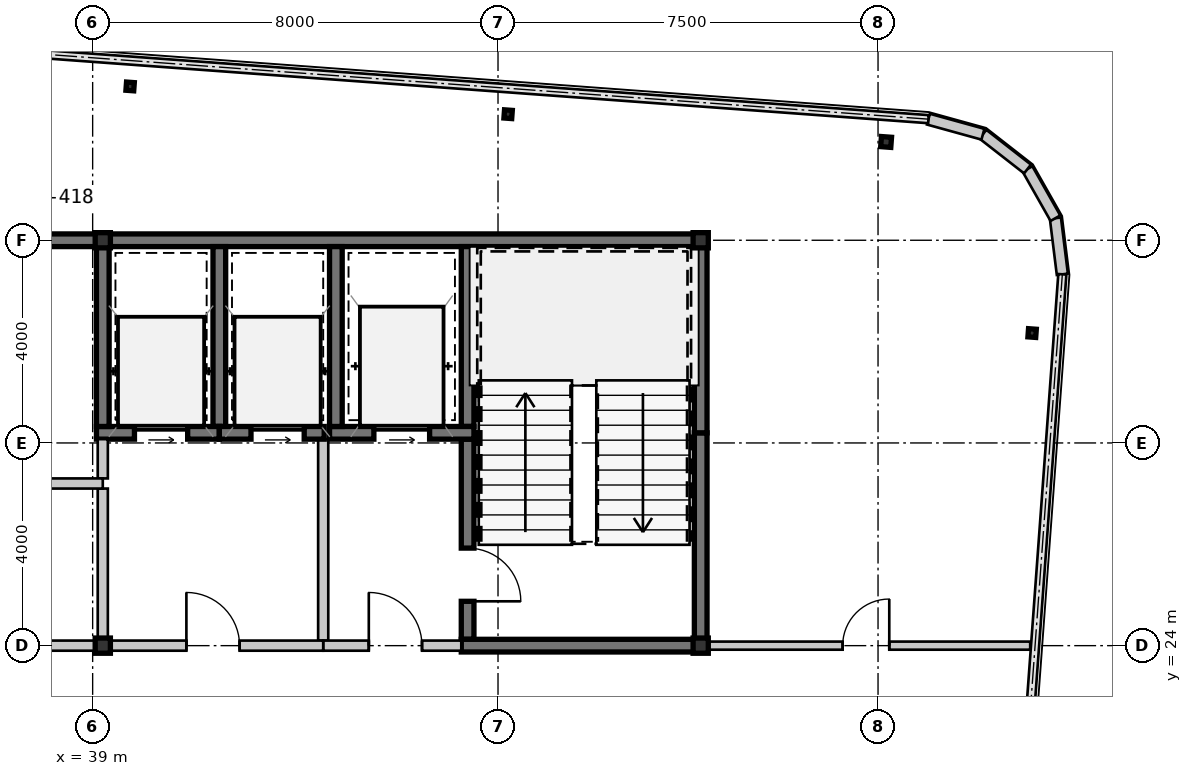
"""IFC4 building model, lengths in metres.
Left out: names, types, materials, properties, quantities, classifications, styles, units other than length and angle.
Written with IfcOpenShell. Run it as: python <this file> out.ifc"""

import sys

from ifc_helpers import new_model, si_unit, direction, frame, frame_2d, origin, origin_2d, place, context, subcontext, project, spatial, rectangle, hollow_rectangle, i_section, extrude, source, transform, mapped, element, fill, save


model = new_model("IFC4")
c1 = context("Model", 3, precision=1e-05, world=origin(), true_north=direction((0.0, 1.0)))
c2 = subcontext(c1, "Body", "Model", "MODEL_VIEW")
j1 = project(units=[si_unit("LENGTHUNIT", "METRE"), si_unit("PLANEANGLEUNIT", "RADIAN")], contexts=[c1])
p1 = place(None, origin())
s1 = spatial("IfcSite", under=j1, at=p1, CompositionType="ELEMENT")
p2 = place(p1, origin())
s2 = spatial("IfcBuilding", under=s1, at=p2, CompositionType="ELEMENT")
p3 = place(p2, frame((0.0, 0.0, 239.75)))
s3 = spatial("IfcBuildingStorey", under=s2, at=p3, CompositionType="ELEMENT", Elevation=239.75)
m1 = source(origin(), c2, "Body", "SweptSolid", [
    extrude(hollow_rectangle(XDim=0.3, YDim=0.3, WallThickness=0.012, at=origin_2d()), origin(), (0.0, 0.0, 1.0), 3.15),
])
for number, where, z_axis, x_axis in (
    (1, (39.2, 24.0, 0.0), (0.0, 0.0, 1.0), (1.0, 0.0, 0.0)),
    (2, (51.0, 24.0, 0.0), (0.0, 0.0, 1.0), (1.0, 0.0, 0.0)),
    (3, (39.2, 32.0, 0.0), (0.0, 0.0, 1.0), (1.0, 0.0, 0.0)),
    (4, (51.0, 32.0, 0.0), (0.0, 0.0, 1.0), (1.0, 0.0, 0.0)),
):
    element("IfcColumn", number, at=place(p3, frame(where, z_axis=z_axis, x_axis=x_axis)), inside=s3, PredefinedType="COLUMN", context=c2, shape_type="MappedRepresentation", body=[
        mapped(m1, transform((0.0, 0.0, 0.0), scale=1.0)),
    ])
m2 = source(origin(), c2, "Body", "SweptSolid", [
    extrude(i_section(OverallWidth=0.154, OverallDepth=0.162, WebThickness=0.008, FlangeThickness=0.011, at=origin_2d()), origin(), (0.0, 0.0, 1.0), 3.15),
])
for number, where, z_axis, x_axis in (
    (5, (39.74, 35.035, 0.0), (0.0, 0.0, 1.0), (0.997, -0.073, 0.0)),
    (6, (47.199, 34.488, 0.0), (0.0, 0.0, 1.0), (0.997, -0.073, 0.0)),
):
    element("IfcColumn", number, at=place(p3, frame(where, z_axis=z_axis, x_axis=x_axis)), inside=s3, PredefinedType="COLUMN", context=c2, shape_type="MappedRepresentation", body=[
        mapped(m2, transform((0.0, 0.0, 0.0), scale=1.0)),
    ])
m3 = source(origin(), c2, "Body", "SweptSolid", [
    extrude(hollow_rectangle(XDim=0.2, YDim=0.2, WallThickness=0.009, at=origin_2d()), origin(), (0.0, 0.0, 1.0), 3.15),
])
p4 = place(p3, frame((54.659, 33.94, 0.0), z_axis=(0.0, 0.0, 1.0), x_axis=(0.997314477224, -0.073238197128, 0.0)))
e7 = element("IfcColumn", 7, at=p4, inside=s3, PredefinedType="COLUMN", context=c2, shape_type="MappedRepresentation", body=[
    mapped(m3, transform((0.0, 0.0, 0.0), scale=1.0)),
])
p5 = place(p3, frame((57.541, 30.169, 0.0), z_axis=(0.0, 0.0, 1.0), x_axis=(0.997314477224, -0.073238197128, 0.0)))
e8 = element("IfcColumn", 8, at=p5, inside=s3, PredefinedType="COLUMN", context=c2, shape_type="MappedRepresentation", body=[
    mapped(m2, transform((0.0, 0.0, 0.0), scale=1.0)),
])
m4 = source(origin(), c2, "Body", "SweptSolid", [
    extrude(rectangle(XDim=1.116, YDim=0.22, at=frame_2d((0.558, 0.0))), origin(), (0.0, 0.0, 1.0), 2.93),
])
p6 = place(p3, frame((58.137, 31.328, 0.0), z_axis=(0.0, 0.0, 1.0), x_axis=(-0.122742076028, 0.992438604032, 0.0)))
e9 = element("IfcWall", 9, at=p6, inside=s3, PredefinedType="SOLIDWALL", context=c2, shape_type="MappedRepresentation", body=[
    mapped(m4, transform((0.0, 0.0, 0.0), scale=1.0)),
])
m5 = source(origin(), c2, "Body", "SweptSolid", [
    extrude(rectangle(XDim=1.116, YDim=0.22, at=frame_2d((0.558, 0.0))), origin(), (0.0, 0.0, 1.0), 2.93),
])
p7 = place(p3, frame((58.0, 32.436, 0.0), z_axis=(0.0, 0.0, 1.0), x_axis=(-0.493167138628, 0.869934579941, 0.0)))
e10 = element("IfcWall", 10, at=p7, inside=s3, PredefinedType="SOLIDWALL", context=c2, shape_type="MappedRepresentation", body=[
    mapped(m5, transform((0.0, 0.0, 0.0), scale=1.0)),
])
p8 = place(p3, frame((57.45, 33.406, 0.0), z_axis=(0.0, 0.0, 1.0), x_axis=(-0.788597772321, 0.614909386406, 0.0)))
e11 = element("IfcWall", 11, at=p8, inside=s3, PredefinedType="SOLIDWALL", context=c2, shape_type="MappedRepresentation", body=[
    mapped(m4, transform((0.0, 0.0, 0.0), scale=1.0)),
])
p9 = place(p3, frame((56.57, 34.093, 0.0), z_axis=(0.0, 0.0, 1.0), x_axis=(-0.963833843713, 0.266503886865, 0.0)))
e12 = element("IfcWall", 12, at=p9, inside=s3, PredefinedType="SOLIDWALL", context=c2, shape_type="MappedRepresentation", body=[
    mapped(m5, transform((0.0, 0.0, 0.0), scale=1.0)),
])
m6 = source(origin(), c2, "Body", "SweptSolid", [
    extrude(rectangle(XDim=11.2, YDim=0.25, at=frame_2d((5.6, 0.0))), origin(), (0.0, 0.0, 1.0), 2.93),
])
p10 = place(p3, frame((28.0, 32.0, 0.0), z_axis=(0.0, 0.0, 1.0), x_axis=(1.0, 0.0, 0.0)))
e13 = element("IfcWall", 13, at=p10, inside=s3, PredefinedType="SHEAR", context=c2, shape_type="MappedRepresentation", body=[
    mapped(m6, transform((0.0, 0.0, 0.0), scale=1.0)),
])
m7 = source(origin(), c2, "Body", "SweptSolid", [
    extrude(rectangle(XDim=11.925, YDim=0.25, at=frame_2d((5.962, 0.0))), origin(), (0.0, 0.0, 1.0), 2.93),
])
p11 = place(p3, frame((39.2, 32.0, 0.0), z_axis=(0.0, 0.0, 1.0), x_axis=(1.0, 0.0, 0.0)))
e14 = element("IfcWall", 14, at=p11, inside=s3, PredefinedType="SHEAR", context=c2, shape_type="MappedRepresentation", body=[
    mapped(m7, transform((0.0, 0.0, 0.0), scale=1.0)),
])
m8 = source(origin(), c2, "Body", "SweptSolid", [
    extrude(rectangle(XDim=4.075, YDim=0.25, at=frame_2d((2.038, 0.0))), origin(), (0.0, 0.0, 1.0), 2.93),
])
p12 = place(p3, frame((51.0, 24.125, 0.0), z_axis=(0.0, 0.0, 1.0), x_axis=(0.0, 1.0, 0.0)))
e15 = element("IfcWall", 15, at=p12, inside=s3, PredefinedType="SHEAR", context=c2, shape_type="MappedRepresentation", body=[
    mapped(m8, transform((0.0, 0.0, 0.0), scale=1.0)),
])
m9 = source(origin(), c2, "Body", "SweptSolid", [
    extrude(rectangle(XDim=3.675, YDim=0.25, at=frame_2d((1.837, 0.0))), origin(), (0.0, 0.0, 1.0), 2.93),
])
p13 = place(p3, frame((51.0, 28.2, 0.0), z_axis=(0.0, 0.0, 1.0), x_axis=(0.0, 1.0, 0.0)))
e16 = element("IfcWall", 16, at=p13, inside=s3, PredefinedType="SHEAR", context=c2, shape_type="MappedRepresentation", body=[
    mapped(m9, transform((0.0, 0.0, 0.0), scale=1.0)),
])
m10 = source(origin(), c2, "Body", "SweptSolid", [
    extrude(rectangle(XDim=3.55, YDim=0.25, at=frame_2d((1.775, 0.0))), origin(), (0.0, 0.0, 1.0), 2.93),
])
p14 = place(p3, frame((46.4, 31.875, 0.0), z_axis=(0.0, 0.0, 1.0), x_axis=(0.0, -1.0, 0.0)))
e17 = element("IfcWall", 17, at=p14, inside=s3, PredefinedType="SHEAR", context=c2, shape_type="MappedRepresentation", body=[
    mapped(m10, transform((0.0, 0.0, 0.0), scale=1.0)),
])
m11 = source(origin(), c2, "Body", "SweptSolid", [
    extrude(rectangle(XDim=3.95, YDim=0.25, at=frame_2d((1.975, 0.0))), origin(), (0.0, 0.0, 1.0), 2.93),
])
p15 = place(p3, frame((46.4, 28.075, 0.0), z_axis=(0.0, 0.0, 1.0), x_axis=(0.0, -1.0, 0.0)))
e18 = element("IfcWall", 18, at=p15, inside=s3, PredefinedType="SHEAR", context=c2, shape_type="MappedRepresentation", body=[
    mapped(m11, transform((0.0, 0.0, 0.0), scale=1.0)),
])
m12 = source(origin(), c2, "Body", "SweptSolid", [
    extrude(rectangle(XDim=1.05, YDim=2.1, at=frame_2d((0.525, 1.05))), frame((0.0, 0.135, 0.0), z_axis=(0.0, -1.0, 0.0), x_axis=(1.0, 0.0, 0.0)), (0.0, 0.0, 1.0), 0.27),
])
p16 = place(p15, frame((2.15, 0.0, 0.0)))
e19 = element("IfcOpeningElement", 19, at=p16, cuts=e18, PredefinedType="OPENING", context=c2, shape_type="MappedRepresentation", body=[
    mapped(m12, transform((0.0, 0.0, 0.0), scale=1.0)),
])
m13 = source(origin(), c2, "Body", "SweptSolid", [
    extrude(rectangle(XDim=4.85, YDim=0.25, at=frame_2d((2.425, 0.0))), origin(), (0.0, 0.0, 1.0), 2.93),
])
p17 = place(p3, frame((46.275, 24.0, 0.0), z_axis=(0.0, 0.0, 1.0), x_axis=(1.0, 0.0, 0.0)))
e20 = element("IfcWall", 20, at=p17, inside=s3, PredefinedType="SHEAR", context=c2, shape_type="MappedRepresentation", body=[
    mapped(m13, transform((0.0, 0.0, 0.0), scale=1.0)),
])
m14 = source(origin(), c2, "Body", "SweptSolid", [
    extrude(rectangle(XDim=2.85, YDim=0.25, at=frame_2d((1.425, 0.0))), origin(), (0.0, 0.0, 1.0), 2.93),
])
p18 = place(p3, frame((43.675, 28.2, 0.0), z_axis=(0.0, 0.0, 1.0), x_axis=(1.0, 0.0, 0.0)))
e21 = element("IfcWall", 21, at=p18, inside=s3, PredefinedType="SHEAR", context=c2, shape_type="MappedRepresentation", body=[
    mapped(m14, transform((0.0, 0.0, 0.0), scale=1.0)),
])
m15 = source(origin(), c2, "Body", "SweptSolid", [
    extrude(rectangle(XDim=1.1, YDim=2.15, at=frame_2d((0.55, 1.075))), frame((0.0, 0.135, 0.0), z_axis=(0.0, -1.0, 0.0), x_axis=(1.0, 0.0, 0.0)), (0.0, 0.0, 1.0), 0.27),
])
p19 = place(p18, frame((0.875, 0.0, 0.0)))
e22 = element("IfcOpeningElement", 22, at=p19, cuts=e21, PredefinedType="OPENING", context=c2, shape_type="MappedRepresentation", body=[
    mapped(m15, transform((0.0, 0.0, 0.0), scale=1.0)),
])
p20 = place(p3, frame((43.8, 31.875, 0.0), z_axis=(0.0, 0.0, 1.0), x_axis=(0.0, -1.0, 0.0)))
e23 = element("IfcWall", 23, at=p20, inside=s3, PredefinedType="SHEAR", context=c2, shape_type="MappedRepresentation", body=[
    mapped(m10, transform((0.0, 0.0, 0.0), scale=1.0)),
])
m16 = source(origin(), c2, "Body", "SweptSolid", [
    extrude(rectangle(XDim=3.975, YDim=0.2, at=frame_2d((1.987, 0.0))), origin(), (0.0, 0.0, 1.0), 2.93),
])
p21 = place(p3, frame((43.55, 28.075, 0.0), z_axis=(0.0, 0.0, 1.0), x_axis=(0.0, -1.0, 0.0)))
e24 = element("IfcWall", 24, at=p21, inside=s3, PredefinedType="SOLIDWALL", context=c2, shape_type="MappedRepresentation", body=[
    mapped(m16, transform((0.0, 0.0, 0.0), scale=1.0)),
])
m17 = source(origin(), c2, "Body", "SweptSolid", [
    extrude(rectangle(XDim=2.725, YDim=0.2, at=frame_2d((1.362, 0.0))), origin(), (0.0, 0.0, 1.0), 2.397),
])
p22 = place(p3, frame((43.55, 24.0, 0.0), z_axis=(0.0, 0.0, 1.0), x_axis=(1.0, 0.0, 0.0)))
e25 = element("IfcWall", 25, at=p22, inside=s3, PredefinedType="SOLIDWALL", context=c2, shape_type="MappedRepresentation", body=[
    mapped(m17, transform((0.0, 0.0, 0.0), scale=1.0)),
])
m18 = source(origin(), c2, "Body", "SweptSolid", [
    extrude(rectangle(XDim=1.05, YDim=2.1, at=frame_2d((0.525, 1.05))), frame((0.0, 0.11, 0.0), z_axis=(0.0, -1.0, 0.0), x_axis=(1.0, 0.0, 0.0)), (0.0, 0.0, 1.0), 0.22),
])
p23 = place(p22, frame((0.9, 0.0, 0.0)))
e26 = element("IfcOpeningElement", 26, at=p23, cuts=e25, PredefinedType="OPENING", context=c2, shape_type="MappedRepresentation", body=[
    mapped(m18, transform((0.0, 0.0, 0.0), scale=1.0)),
])
p24 = place(p3, frame((41.5, 28.325, 0.0), z_axis=(0.0, 0.0, 1.0), x_axis=(0.0, 1.0, 0.0)))
e27 = element("IfcWall", 27, at=p24, inside=s3, PredefinedType="SHEAR", context=c2, shape_type="MappedRepresentation", body=[
    mapped(m10, transform((0.0, 0.0, 0.0), scale=1.0)),
])
m19 = source(origin(), c2, "Body", "SweptSolid", [
    extrude(rectangle(XDim=2.425, YDim=0.25, at=frame_2d((1.212, 0.0))), origin(), (0.0, 0.0, 1.0), 2.93),
])
p25 = place(p3, frame((39.075, 28.2, 0.0), z_axis=(0.0, 0.0, 1.0), x_axis=(1.0, 0.0, 0.0)))
e28 = element("IfcWall", 28, at=p25, inside=s3, PredefinedType="SHEAR", context=c2, shape_type="MappedRepresentation", body=[
    mapped(m19, transform((0.0, 0.0, 0.0), scale=1.0)),
])
m20 = source(origin(), c2, "Body", "SweptSolid", [
    extrude(rectangle(XDim=1.05, YDim=2.15, at=frame_2d((0.525, 1.075))), frame((0.0, 0.135, 0.0), z_axis=(0.0, -1.0, 0.0), x_axis=(1.0, 0.0, 0.0)), (0.0, 0.0, 1.0), 0.27),
])
p26 = place(p25, frame((0.75, 0.0, 0.0)))
e29 = element("IfcOpeningElement", 29, at=p26, cuts=e28, PredefinedType="OPENING", context=c2, shape_type="MappedRepresentation", body=[
    mapped(m20, transform((0.0, 0.0, 0.0), scale=1.0)),
])
p27 = place(p3, frame((39.2, 31.875, 0.0), z_axis=(0.0, 0.0, 1.0), x_axis=(0.0, -1.0, 0.0)))
e30 = element("IfcWall", 30, at=p27, inside=s3, PredefinedType="SHEAR", context=c2, shape_type="MappedRepresentation", body=[
    mapped(m10, transform((0.0, 0.0, 0.0), scale=1.0)),
])
m21 = source(origin(), c2, "Body", "SweptSolid", [
    extrude(rectangle(XDim=2.07, YDim=0.25, at=frame_2d((1.035, 0.0))), origin(), (0.0, 0.0, 1.0), 2.93),
])
p28 = place(p3, frame((41.5, 28.2, 0.0), z_axis=(0.0, 0.0, 1.0), x_axis=(1.0, 0.0, 0.0)))
e31 = element("IfcWall", 31, at=p28, inside=s3, PredefinedType="SHEAR", context=c2, shape_type="MappedRepresentation", body=[
    mapped(m21, transform((0.0, 0.0, 0.0), scale=1.0)),
])
p29 = place(p28, frame((0.625, 0.0, 0.0)))
e32 = element("IfcOpeningElement", 32, at=p29, cuts=e31, PredefinedType="OPENING", context=c2, shape_type="MappedRepresentation", body=[
    mapped(m20, transform((0.0, 0.0, 0.0), scale=1.0)),
])
m22 = source(origin(), c2, "Body", "SweptSolid", [
    extrude(rectangle(XDim=3.0, YDim=0.2, at=frame_2d((1.5, 0.0))), origin(), (0.0, 0.0, 1.0), 2.47),
])
p30 = place(p3, frame((39.2, 24.1, 0.0), z_axis=(0.0, 0.0, 1.0), x_axis=(0.0, 1.0, 0.0)))
e33 = element("IfcWall", 33, at=p30, inside=s3, PredefinedType="SOLIDWALL", context=c2, shape_type="MappedRepresentation", body=[
    mapped(m22, transform((0.0, 0.0, 0.0), scale=1.0)),
])
m23 = source(origin(), c2, "Body", "SweptSolid", [
    extrude(rectangle(XDim=0.775, YDim=0.2, at=frame_2d((0.387, 0.0))), origin(), (0.0, 0.0, 1.0), 2.47),
])
p31 = place(p3, frame((39.2, 27.3, 0.0), z_axis=(0.0, 0.0, 1.0), x_axis=(0.0, 1.0, 0.0)))
e34 = element("IfcWall", 34, at=p31, inside=s3, PredefinedType="SOLIDWALL", context=c2, shape_type="MappedRepresentation", body=[
    mapped(m23, transform((0.0, 0.0, 0.0), scale=1.0)),
])
m24 = source(origin(), c2, "Body", "SweptSolid", [
    extrude(rectangle(XDim=4.35, YDim=0.2, at=frame_2d((2.175, 0.0))), origin(), (0.0, 0.0, 1.0), 2.397),
])
p32 = place(p3, frame((43.55, 24.0, 0.0), z_axis=(0.0, 0.0, 1.0), x_axis=(-1.0, 0.0, 0.0)))
e35 = element("IfcWall", 35, at=p32, inside=s3, PredefinedType="SOLIDWALL", context=c2, shape_type="MappedRepresentation", body=[
    mapped(m24, transform((0.0, 0.0, 0.0), scale=1.0)),
])
p33 = place(p32, frame((1.65, 0.0, 0.0)))
e36 = element("IfcOpeningElement", 36, at=p33, cuts=e35, PredefinedType="OPENING", context=c2, shape_type="MappedRepresentation", body=[
    mapped(m18, transform((0.0, 0.0, 0.0), scale=1.0)),
])
m25 = source(origin(), c2, "Body", "SweptSolid", [
    extrude(rectangle(XDim=4.05, YDim=0.2, at=frame_2d((2.025, 0.0))), origin(), (0.0, 0.0, 1.0), 2.93),
])
p34 = place(p3, frame((35.15, 27.2, 0.0), z_axis=(0.0, 0.0, 1.0), x_axis=(1.0, 0.0, 0.0)))
e37 = element("IfcWall", 37, at=p34, inside=s3, PredefinedType="SOLIDWALL", context=c2, shape_type="MappedRepresentation", body=[
    mapped(m25, transform((0.0, 0.0, 0.0), scale=1.0)),
])
p35 = place(p34, frame((0.42, 0.0, 0.0)))
e38 = element("IfcOpeningElement", 38, at=p35, cuts=e37, PredefinedType="OPENING", context=c2, shape_type="MappedRepresentation", body=[
    mapped(m18, transform((0.0, 0.0, 0.0), scale=1.0)),
])
m26 = source(origin(), c2, "Body", "SweptSolid", [
    extrude(rectangle(XDim=4.05, YDim=0.2, at=frame_2d((2.025, 0.0))), origin(), (0.0, 0.0, 1.0), 2.47),
])
p36 = place(p3, frame((39.2, 24.0, 0.0), z_axis=(0.0, 0.0, 1.0), x_axis=(-1.0, 0.0, 0.0)))
e39 = element("IfcWall", 39, at=p36, inside=s3, PredefinedType="SOLIDWALL", context=c2, shape_type="MappedRepresentation", body=[
    mapped(m26, transform((0.0, 0.0, 0.0), scale=1.0)),
])
p37 = place(p36, frame((1.5, 0.0, 0.0)))
e40 = element("IfcOpeningElement", 40, at=p37, cuts=e39, PredefinedType="OPENING", context=c2, shape_type="MappedRepresentation", body=[
    mapped(m18, transform((0.0, 0.0, 0.0), scale=1.0)),
])
m27 = source(origin(), c2, "Body", "SweptSolid", [
    extrude(rectangle(XDim=6.378, YDim=0.16, at=frame_2d((3.189, 0.0))), origin(), (0.0, 0.0, 1.0), 2.93),
])
p38 = place(p3, frame((51.125, 24.0, 0.0), z_axis=(0.0, 0.0, 1.0), x_axis=(1.0, 0.0, 0.0)))
e41 = element("IfcWall", 41, at=p38, inside=s3, PredefinedType="PARTITIONING", context=c2, shape_type="MappedRepresentation", body=[
    mapped(m27, transform((0.0, 0.0, 0.0), scale=1.0)),
])
m28 = source(origin(), c2, "Body", "SweptSolid", [
    extrude(rectangle(XDim=0.92, YDim=2.1, at=frame_2d((0.46, 1.05))), frame((0.0, 0.09, 0.0), z_axis=(0.0, -1.0, 0.0), x_axis=(1.0, 0.0, 0.0)), (0.0, 0.0, 1.0), 0.18),
])
p39 = place(p38, frame((2.677, 0.0, 0.0)))
e42 = element("IfcOpeningElement", 42, at=p39, cuts=e41, PredefinedType="OPENING", context=c2, shape_type="MappedRepresentation", body=[
    mapped(m28, transform((0.0, 0.0, 0.0), scale=1.0)),
])
m29 = source(origin(), c2, "Body", "SweptSolid", [
    extrude(rectangle(XDim=1.05, YDim=2.1, at=frame_2d((0.525, 1.05))), frame((0.0, 0.025, 0.0), z_axis=(0.0, -1.0, 0.0), x_axis=(1.0, 0.0, 0.0)), (0.0, 0.0, 1.0), 0.05),
])
p40 = place(p16, origin())
e43 = element("IfcDoor", 43, at=p40, inside=s3, OperationType="SINGLE_SWING_RIGHT", PredefinedType="DOOR", context=c2, shape_type="MappedRepresentation", body=[
    mapped(m29, transform((0.0, 0.0, 0.0), scale=1.0)),
])
fill(e19, e43)
m30 = source(origin(), c2, "Body", "SweptSolid", [
    extrude(rectangle(XDim=1.1, YDim=2.15, at=frame_2d((0.55, 1.075))), frame((0.0, 0.025, 0.0), z_axis=(0.0, -1.0, 0.0), x_axis=(1.0, 0.0, 0.0)), (0.0, 0.0, 1.0), 0.05),
])
p41 = place(p19, origin())
e44 = element("IfcDoor", 44, at=p41, inside=s3, OperationType="SLIDING_TO_LEFT", PredefinedType="DOOR", context=c2, shape_type="MappedRepresentation", body=[
    mapped(m30, transform((0.0, 0.0, 0.0), scale=1.0)),
])
fill(e22, e44)
p42 = place(p23, origin())
e45 = element("IfcDoor", 45, at=p42, inside=s3, OperationType="SINGLE_SWING_LEFT", PredefinedType="DOOR", context=c2, shape_type="MappedRepresentation", body=[
    mapped(m29, transform((0.0, 0.0, 0.0), scale=1.0)),
])
fill(e26, e45)
m31 = source(origin(), c2, "Body", "SweptSolid", [
    extrude(rectangle(XDim=1.05, YDim=2.15, at=frame_2d((0.525, 1.075))), frame((0.0, 0.025, 0.0), z_axis=(0.0, -1.0, 0.0), x_axis=(1.0, 0.0, 0.0)), (0.0, 0.0, 1.0), 0.05),
])
p43 = place(p26, origin())
e46 = element("IfcDoor", 46, at=p43, inside=s3, OperationType="SLIDING_TO_LEFT", PredefinedType="DOOR", context=c2, shape_type="MappedRepresentation", body=[
    mapped(m31, transform((0.0, 0.0, 0.0), scale=1.0)),
])
fill(e29, e46)
p44 = place(p29, origin())
e47 = element("IfcDoor", 47, at=p44, inside=s3, OperationType="SLIDING_TO_LEFT", PredefinedType="DOOR", context=c2, shape_type="MappedRepresentation", body=[
    mapped(m31, transform((0.0, 0.0, 0.0), scale=1.0)),
])
fill(e32, e47)
p45 = place(p33, frame((1.05, 0.0, 0.0), z_axis=(0.0, 0.0, 1.0), x_axis=(-1.0, 0.0, 0.0)))
e48 = element("IfcDoor", 48, at=p45, inside=s3, OperationType="SINGLE_SWING_LEFT", PredefinedType="DOOR", context=c2, shape_type="MappedRepresentation", body=[
    mapped(m29, transform((0.0, 0.0, 0.0), scale=1.0)),
])
fill(e36, e48)
m32 = source(origin(), c2, "Body", "SweptSolid", [
    extrude(rectangle(XDim=0.92, YDim=2.1, at=frame_2d((0.46, 1.05))), frame((0.0, 0.025, 0.0), z_axis=(0.0, -1.0, 0.0), x_axis=(1.0, 0.0, 0.0)), (0.0, 0.0, 1.0), 0.05),
])
p46 = place(p39, origin())
e49 = element("IfcDoor", 49, at=p46, inside=s3, OperationType="SINGLE_SWING_RIGHT", PredefinedType="DOOR", context=c2, shape_type="MappedRepresentation", body=[
    mapped(m32, transform((0.0, 0.0, 0.0), scale=1.0)),
])
fill(e42, e49)
save(model, sys.argv[1])
